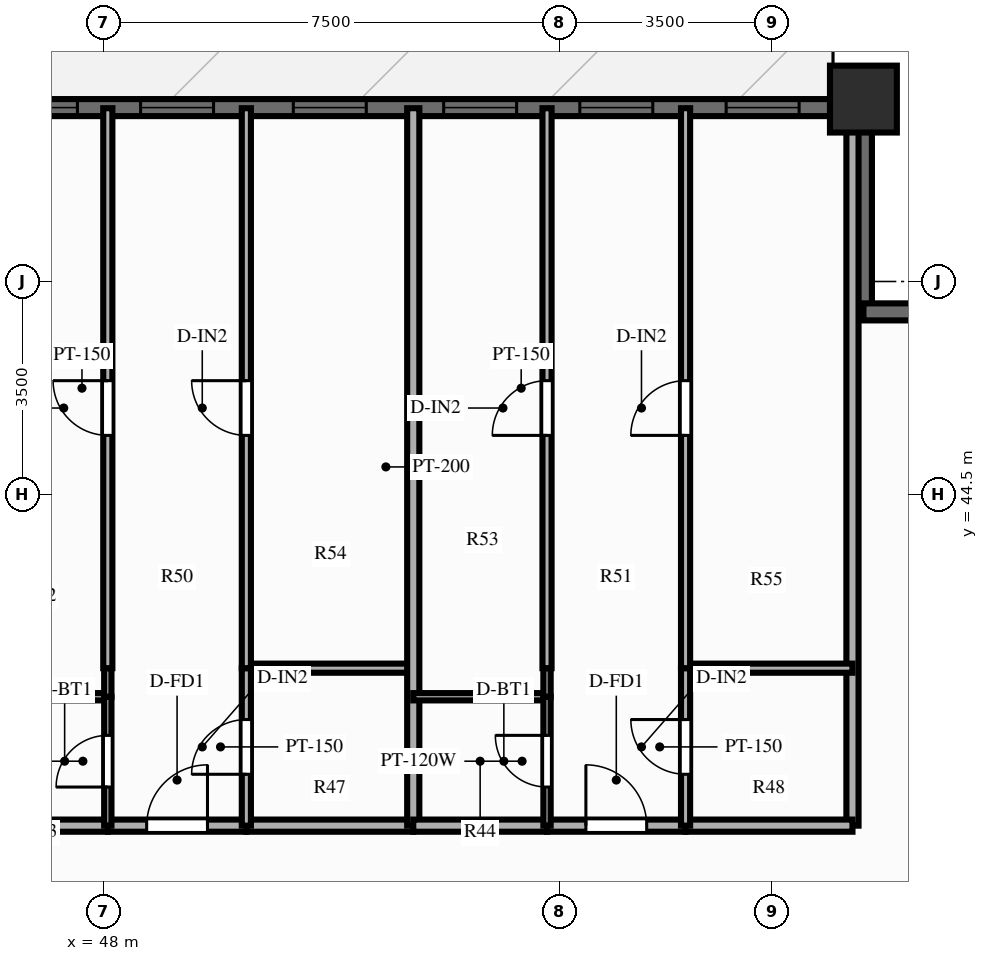
"""IFC4 building model, lengths in metres.
Left out: names, types, materials, properties, quantities, classifications, styles, units other than length and angle.
Written with IfcOpenShell. Run it as: python <this file> out.ifc"""

import sys

from ifc_helpers import new_model, si_unit, direction, frame, frame_2d, origin, origin_2d, place, context, subcontext, project, spatial, rectangle, extrude, source, transform, mapped, element, fill, save


model = new_model("IFC4")
c1 = context("Model", 3, precision=1e-05, world=origin(), true_north=direction((0.0, 1.0)))
c2 = subcontext(c1, "Body", "Model", "MODEL_VIEW")
j1 = project(units=[si_unit("LENGTHUNIT", "METRE"), si_unit("PLANEANGLEUNIT", "RADIAN")], contexts=[c1])
p1 = place(None, origin())
s1 = spatial("IfcSite", under=j1, at=p1, CompositionType="ELEMENT")
p2 = place(p1, origin())
s2 = spatial("IfcBuilding", under=s1, at=p2, CompositionType="ELEMENT")
p3 = place(p2, frame((0.0, 0.0, 22.4)))
s3 = spatial("IfcBuildingStorey", under=s2, at=p3, CompositionType="ELEMENT", Elevation=22.4)
m1 = source(origin(), c2, "Body", "SweptSolid", [
    extrude(rectangle(XDim=1.1, YDim=1.1, at=origin_2d()), origin(), (0.0, 0.0, 1.0), 3.0),
])
p4 = place(p3, frame((60.5, 51.0, 0.0), z_axis=(0.0, 0.0, 1.0), x_axis=(1.0, 0.0, 0.0)))
e1 = element("IfcColumn", 1, at=p4, inside=s3, PredefinedType="COLUMN", context=c2, shape_type="MappedRepresentation", body=[
    mapped(m1, transform((0.0, 0.0, 0.0), scale=1.0)),
])
p5 = place(p3, frame((15.5, 50.86, 0.0), z_axis=(0.0, 0.0, 1.0), x_axis=(1.0, 0.0, 0.0)))
e2 = element("IfcWall", 2, at=p5, inside=s3, PredefinedType="SOLIDWALL", context=c2, shape_type="SweptSolid", body=[
    extrude(rectangle(XDim=45.0, YDim=0.28, at=frame_2d((22.5, 0.0))), origin(), (0.0, 0.0, 1.0), 2.28),
])
p6 = place(p5, frame((0.76, 0.0, 0.25)))
e3 = element("IfcOpeningElement", 3, at=p6, cuts=e2, PredefinedType="OPENING", context=c2, shape_type="SweptSolid", body=[
    extrude(rectangle(XDim=1.2, YDim=1.5, at=frame_2d((0.6, 0.75))), frame((0.0, 0.152, 0.0), z_axis=(0.0, -1.0, 0.0), x_axis=(1.0, 0.0, 0.0)), (0.0, 0.0, 1.0), 0.304),
])
p7 = place(p5, frame((3.494, 0.0, 0.25)))
e4 = element("IfcOpeningElement", 4, at=p7, cuts=e2, PredefinedType="OPENING", context=c2, shape_type="SweptSolid", body=[
    extrude(rectangle(XDim=1.2, YDim=1.5, at=frame_2d((0.6, 0.75))), frame((0.0, 0.152, 0.0), z_axis=(0.0, -1.0, 0.0), x_axis=(1.0, 0.0, 0.0)), (0.0, 0.0, 1.0), 0.304),
])
p8 = place(p5, frame((8.741, 0.0, 0.25)))
e5 = element("IfcOpeningElement", 5, at=p8, cuts=e2, PredefinedType="OPENING", context=c2, shape_type="SweptSolid", body=[
    extrude(rectangle(XDim=1.2, YDim=1.5, at=frame_2d((0.6, 0.75))), frame((0.0, 0.152, 0.0), z_axis=(0.0, -1.0, 0.0), x_axis=(1.0, 0.0, 0.0)), (0.0, 0.0, 1.0), 0.304),
])
p9 = place(p5, frame((13.616, 0.0, 0.25)))
e6 = element("IfcOpeningElement", 6, at=p9, cuts=e2, PredefinedType="OPENING", context=c2, shape_type="SweptSolid", body=[
    extrude(rectangle(XDim=1.2, YDim=1.5, at=frame_2d((0.6, 0.75))), frame((0.0, 0.152, 0.0), z_axis=(0.0, -1.0, 0.0), x_axis=(1.0, 0.0, 0.0)), (0.0, 0.0, 1.0), 0.304),
])
p10 = place(p5, frame((17.146, 0.0, 0.25)))
e7 = element("IfcOpeningElement", 7, at=p10, cuts=e2, PredefinedType="OPENING", context=c2, shape_type="SweptSolid", body=[
    extrude(rectangle(XDim=1.2, YDim=1.5, at=frame_2d((0.6, 0.75))), frame((0.0, 0.152, 0.0), z_axis=(0.0, -1.0, 0.0), x_axis=(1.0, 0.0, 0.0)), (0.0, 0.0, 1.0), 0.304),
])
p11 = place(p5, frame((22.423, 0.0, 0.0)))
e8 = element("IfcOpeningElement", 8, at=p11, cuts=e2, PredefinedType="OPENING", context=c2, shape_type="SweptSolid", body=[
    extrude(rectangle(XDim=1.1, YDim=2.15, at=frame_2d((0.55, 1.075))), frame((0.0, 0.152, 0.0), z_axis=(0.0, -1.0, 0.0), x_axis=(1.0, 0.0, 0.0)), (0.0, 0.0, 1.0), 0.304),
])
p12 = place(p5, frame((27.252, 0.0, 0.25)))
e9 = element("IfcOpeningElement", 9, at=p12, cuts=e2, PredefinedType="OPENING", context=c2, shape_type="SweptSolid", body=[
    extrude(rectangle(XDim=0.95, YDim=1.5, at=frame_2d((0.475, 0.75))), frame((0.0, 0.152, 0.0), z_axis=(0.0, -1.0, 0.0), x_axis=(1.0, 0.0, 0.0)), (0.0, 0.0, 1.0), 0.304),
])
p13 = place(p5, frame((30.873, 0.0, 0.25)))
e10 = element("IfcOpeningElement", 10, at=p13, cuts=e2, PredefinedType="OPENING", context=c2, shape_type="SweptSolid", body=[
    extrude(rectangle(XDim=1.2, YDim=1.5, at=frame_2d((0.6, 0.75))), frame((0.0, 0.152, 0.0), z_axis=(0.0, -1.0, 0.0), x_axis=(1.0, 0.0, 0.0)), (0.0, 0.0, 1.0), 0.304),
])
p14 = place(p5, frame((33.113, 0.0, 0.25)))
e11 = element("IfcOpeningElement", 11, at=p14, cuts=e2, PredefinedType="OPENING", context=c2, shape_type="SweptSolid", body=[
    extrude(rectangle(XDim=1.2, YDim=1.5, at=frame_2d((0.6, 0.75))), frame((0.0, 0.152, 0.0), z_axis=(0.0, -1.0, 0.0), x_axis=(1.0, 0.0, 0.0)), (0.0, 0.0, 1.0), 0.304),
])
p15 = place(p5, frame((35.624, 0.0, 0.25)))
e12 = element("IfcOpeningElement", 12, at=p15, cuts=e2, PredefinedType="OPENING", context=c2, shape_type="SweptSolid", body=[
    extrude(rectangle(XDim=1.2, YDim=1.5, at=frame_2d((0.6, 0.75))), frame((0.0, 0.152, 0.0), z_axis=(0.0, -1.0, 0.0), x_axis=(1.0, 0.0, 0.0)), (0.0, 0.0, 1.0), 0.304),
])
p16 = place(p5, frame((38.097, 0.0, 0.25)))
e13 = element("IfcOpeningElement", 13, at=p16, cuts=e2, PredefinedType="OPENING", context=c2, shape_type="SweptSolid", body=[
    extrude(rectangle(XDim=1.2, YDim=1.5, at=frame_2d((0.6, 0.75))), frame((0.0, 0.152, 0.0), z_axis=(0.0, -1.0, 0.0), x_axis=(1.0, 0.0, 0.0)), (0.0, 0.0, 1.0), 0.304),
])
p17 = place(p5, frame((40.336, 0.0, 0.25)))
e14 = element("IfcOpeningElement", 14, at=p17, cuts=e2, PredefinedType="OPENING", context=c2, shape_type="SweptSolid", body=[
    extrude(rectangle(XDim=1.2, YDim=1.5, at=frame_2d((0.6, 0.75))), frame((0.0, 0.152, 0.0), z_axis=(0.0, -1.0, 0.0), x_axis=(1.0, 0.0, 0.0)), (0.0, 0.0, 1.0), 0.304),
])
p18 = place(p5, frame((42.743, 0.0, 0.25)))
e15 = element("IfcOpeningElement", 15, at=p18, cuts=e2, PredefinedType="OPENING", context=c2, shape_type="SweptSolid", body=[
    extrude(rectangle(XDim=1.2, YDim=1.5, at=frame_2d((0.6, 0.75))), frame((0.0, 0.152, 0.0), z_axis=(0.0, -1.0, 0.0), x_axis=(1.0, 0.0, 0.0)), (0.0, 0.0, 1.0), 0.304),
])
for number, where, z_axis, x_axis in (
    (16, (60.5, 47.5, 0.0), (0.0, 0.0, 1.0), (0.0, 1.0, 0.0)),
    (17, (60.5, 47.5, 0.0), (0.0, 0.0, 1.0), (1.0, 0.0, 0.0)),
):
    element("IfcWall", number, at=place(p3, frame(where, z_axis=z_axis, x_axis=x_axis)), inside=s3, PredefinedType="SOLIDWALL", context=c2, shape_type="SweptSolid", body=[
        extrude(rectangle(XDim=3.42, YDim=0.28, at=frame_2d((1.71, 0.0))), origin(), (0.0, 0.0, 1.0), 2.28),
    ])
p19 = place(p3, frame((60.32, 39.05, 0.0), z_axis=(0.0, 0.0, 1.0), x_axis=(0.0, 1.0, 0.0)))
e18 = element("IfcWall", 18, at=p19, inside=s3, PredefinedType="PARTITIONING", context=c2, shape_type="SweptSolid", body=[
    extrude(rectangle(XDim=11.8, YDim=0.2, at=frame_2d((5.9, 0.0))), origin(), (0.0, 0.0, 1.0), 2.79),
])
p20 = place(p3, frame((45.873, 39.05, 0.0), z_axis=(0.0, 0.0, 1.0), x_axis=(1.0, 0.0, 0.0)))
e19 = element("IfcWall", 19, at=p20, inside=s3, PredefinedType="PARTITIONING", context=c2, shape_type="SweptSolid", body=[
    extrude(rectangle(XDim=2.2, YDim=0.2, at=frame_2d((1.1, 0.0))), origin(), (0.0, 0.0, 1.0), 2.79),
])
p21 = place(p3, frame((48.073, 39.05, 0.0), z_axis=(0.0, 0.0, 1.0), x_axis=(1.0, 0.0, 0.0)))
e20 = element("IfcWall", 20, at=p21, inside=s3, PredefinedType="PARTITIONING", context=c2, shape_type="SweptSolid", body=[
    extrude(rectangle(XDim=2.278, YDim=0.2, at=frame_2d((1.139, 0.0))), origin(), (0.0, 0.0, 1.0), 2.79),
])
p22 = place(p21, frame((0.639, 0.0, 0.0)))
e21 = element("IfcOpeningElement", 21, at=p22, cuts=e20, PredefinedType="OPENING", context=c2, shape_type="SweptSolid", body=[
    extrude(rectangle(XDim=1.0, YDim=2.15, at=frame_2d((0.5, 1.075))), frame((0.0, 0.112, 0.0), z_axis=(0.0, -1.0, 0.0), x_axis=(1.0, 0.0, 0.0)), (0.0, 0.0, 1.0), 0.224),
])
p23 = place(p3, frame((50.352, 39.05, 0.0), z_axis=(0.0, 0.0, 1.0), x_axis=(1.0, 0.0, 0.0)))
e22 = element("IfcWall", 22, at=p23, inside=s3, PredefinedType="PARTITIONING", context=c2, shape_type="SweptSolid", body=[
    extrude(rectangle(XDim=2.745, YDim=0.2, at=frame_2d((1.373, 0.0))), origin(), (0.0, 0.0, 1.0), 2.79),
])
p24 = place(p3, frame((45.873, 41.17, 0.0), z_axis=(0.0, 0.0, 1.0), x_axis=(1.0, 0.0, 0.0)))
e23 = element("IfcWall", 23, at=p24, inside=s3, PredefinedType="PARTITIONING", context=c2, shape_type="SweptSolid", body=[
    extrude(rectangle(XDim=2.2, YDim=0.12, at=frame_2d((1.1, 0.0))), origin(), (0.0, 0.0, 1.0), 2.79),
])
p25 = place(p3, frame((50.352, 41.64, 0.0), z_axis=(0.0, 0.0, 1.0), x_axis=(1.0, 0.0, 0.0)))
e24 = element("IfcWall", 24, at=p25, inside=s3, PredefinedType="PARTITIONING", context=c2, shape_type="SweptSolid", body=[
    extrude(rectangle(XDim=2.745, YDim=0.15, at=frame_2d((1.373, 0.0))), origin(), (0.0, 0.0, 1.0), 2.79),
])
p26 = place(p3, frame((48.073, 39.05, 0.0), z_axis=(0.0, 0.0, 1.0), x_axis=(0.0, 1.0, 0.0)))
e25 = element("IfcWall", 25, at=p26, inside=s3, PredefinedType="PARTITIONING", context=c2, shape_type="SweptSolid", body=[
    extrude(rectangle(XDim=2.12, YDim=0.12, at=frame_2d((1.06, 0.0))), origin(), (0.0, 0.0, 1.0), 2.79),
])
p27 = place(p26, frame((0.635, 0.0, 0.0)))
e26 = element("IfcOpeningElement", 26, at=p27, cuts=e25, PredefinedType="OPENING", context=c2, shape_type="SweptSolid", body=[
    extrude(rectangle(XDim=0.85, YDim=2.05, at=frame_2d((0.425, 1.025))), frame((0.0, 0.072, 0.0), z_axis=(0.0, -1.0, 0.0), x_axis=(1.0, 0.0, 0.0)), (0.0, 0.0, 1.0), 0.144),
])
p28 = place(p3, frame((48.073, 41.17, 0.0), z_axis=(0.0, 0.0, 1.0), x_axis=(0.0, 1.0, 0.0)))
e27 = element("IfcWall", 27, at=p28, inside=s3, PredefinedType="PARTITIONING", context=c2, shape_type="SweptSolid", body=[
    extrude(rectangle(XDim=0.47, YDim=0.12, at=frame_2d((0.235, 0.0))), origin(), (0.0, 0.0, 1.0), 2.79),
])
p29 = place(p3, frame((48.073, 41.64, 0.0), z_axis=(0.0, 0.0, 1.0), x_axis=(0.0, 1.0, 0.0)))
e28 = element("IfcWall", 28, at=p29, inside=s3, PredefinedType="PARTITIONING", context=c2, shape_type="SweptSolid", body=[
    extrude(rectangle(XDim=9.21, YDim=0.15, at=frame_2d((4.605, 0.0))), origin(), (0.0, 0.0, 1.0), 2.79),
])
p30 = place(p29, frame((3.829, 0.0, 0.0)))
e29 = element("IfcOpeningElement", 29, at=p30, cuts=e28, PredefinedType="OPENING", context=c2, shape_type="SweptSolid", body=[
    extrude(rectangle(XDim=0.9, YDim=2.1, at=frame_2d((0.45, 1.05))), frame((0.0, 0.087, 0.0), z_axis=(0.0, -1.0, 0.0), x_axis=(1.0, 0.0, 0.0)), (0.0, 0.0, 1.0), 0.174),
])
p31 = place(p3, frame((50.352, 39.05, 0.0), z_axis=(0.0, 0.0, 1.0), x_axis=(0.0, 1.0, 0.0)))
e30 = element("IfcWall", 30, at=p31, inside=s3, PredefinedType="PARTITIONING", context=c2, shape_type="SweptSolid", body=[
    extrude(rectangle(XDim=2.59, YDim=0.15, at=frame_2d((1.295, 0.0))), origin(), (0.0, 0.0, 1.0), 2.79),
])
p32 = place(p31, frame((0.845, 0.0, 0.0)))
e31 = element("IfcOpeningElement", 31, at=p32, cuts=e30, PredefinedType="OPENING", context=c2, shape_type="SweptSolid", body=[
    extrude(rectangle(XDim=0.9, YDim=2.1, at=frame_2d((0.45, 1.05))), frame((0.0, 0.087, 0.0), z_axis=(0.0, -1.0, 0.0), x_axis=(1.0, 0.0, 0.0)), (0.0, 0.0, 1.0), 0.174),
])
p33 = place(p3, frame((50.352, 41.64, 0.0), z_axis=(0.0, 0.0, 1.0), x_axis=(0.0, 1.0, 0.0)))
e32 = element("IfcWall", 32, at=p33, inside=s3, PredefinedType="PARTITIONING", context=c2, shape_type="SweptSolid", body=[
    extrude(rectangle(XDim=9.21, YDim=0.15, at=frame_2d((4.605, 0.0))), origin(), (0.0, 0.0, 1.0), 2.79),
])
p34 = place(p33, frame((3.829, 0.0, 0.0)))
e33 = element("IfcOpeningElement", 33, at=p34, cuts=e32, PredefinedType="OPENING", context=c2, shape_type="SweptSolid", body=[
    extrude(rectangle(XDim=0.9, YDim=2.1, at=frame_2d((0.45, 1.05))), frame((0.0, 0.087, 0.0), z_axis=(0.0, -1.0, 0.0), x_axis=(1.0, 0.0, 0.0)), (0.0, 0.0, 1.0), 0.174),
])
p35 = place(p3, frame((53.097, 39.05, 0.0), z_axis=(0.0, 0.0, 1.0), x_axis=(0.0, 1.0, 0.0)))
e34 = element("IfcWall", 34, at=p35, inside=s3, PredefinedType="PARTITIONING", context=c2, shape_type="SweptSolid", body=[
    extrude(rectangle(XDim=11.8, YDim=0.2, at=frame_2d((5.9, 0.0))), origin(), (0.0, 0.0, 1.0), 2.79),
])
p36 = place(p3, frame((53.097, 39.05, 0.0), z_axis=(0.0, 0.0, 1.0), x_axis=(1.0, 0.0, 0.0)))
e35 = element("IfcWall", 35, at=p36, inside=s3, PredefinedType="PARTITIONING", context=c2, shape_type="SweptSolid", body=[
    extrude(rectangle(XDim=2.2, YDim=0.2, at=frame_2d((1.1, 0.0))), origin(), (0.0, 0.0, 1.0), 2.79),
])
p37 = place(p3, frame((55.297, 39.05, 0.0), z_axis=(0.0, 0.0, 1.0), x_axis=(1.0, 0.0, 0.0)))
e36 = element("IfcWall", 36, at=p37, inside=s3, PredefinedType="PARTITIONING", context=c2, shape_type="SweptSolid", body=[
    extrude(rectangle(XDim=2.279, YDim=0.2, at=frame_2d((1.139, 0.0))), origin(), (0.0, 0.0, 1.0), 2.79),
])
p38 = place(p37, frame((0.639, 0.0, 0.0)))
e37 = element("IfcOpeningElement", 37, at=p38, cuts=e36, PredefinedType="OPENING", context=c2, shape_type="SweptSolid", body=[
    extrude(rectangle(XDim=1.0, YDim=2.15, at=frame_2d((0.5, 1.075))), frame((0.0, 0.112, 0.0), z_axis=(0.0, -1.0, 0.0), x_axis=(1.0, 0.0, 0.0)), (0.0, 0.0, 1.0), 0.224),
])
p39 = place(p3, frame((57.575, 39.05, 0.0), z_axis=(0.0, 0.0, 1.0), x_axis=(1.0, 0.0, 0.0)))
e38 = element("IfcWall", 38, at=p39, inside=s3, PredefinedType="PARTITIONING", context=c2, shape_type="SweptSolid", body=[
    extrude(rectangle(XDim=2.745, YDim=0.2, at=frame_2d((1.373, 0.0))), origin(), (0.0, 0.0, 1.0), 2.79),
])
p40 = place(p3, frame((53.097, 41.17, 0.0), z_axis=(0.0, 0.0, 1.0), x_axis=(1.0, 0.0, 0.0)))
e39 = element("IfcWall", 39, at=p40, inside=s3, PredefinedType="PARTITIONING", context=c2, shape_type="SweptSolid", body=[
    extrude(rectangle(XDim=2.2, YDim=0.12, at=frame_2d((1.1, 0.0))), origin(), (0.0, 0.0, 1.0), 2.79),
])
p41 = place(p3, frame((57.575, 41.64, 0.0), z_axis=(0.0, 0.0, 1.0), x_axis=(1.0, 0.0, 0.0)))
e40 = element("IfcWall", 40, at=p41, inside=s3, PredefinedType="PARTITIONING", context=c2, shape_type="SweptSolid", body=[
    extrude(rectangle(XDim=2.745, YDim=0.15, at=frame_2d((1.373, 0.0))), origin(), (0.0, 0.0, 1.0), 2.79),
])
p42 = place(p3, frame((55.297, 39.05, 0.0), z_axis=(0.0, 0.0, 1.0), x_axis=(0.0, 1.0, 0.0)))
e41 = element("IfcWall", 41, at=p42, inside=s3, PredefinedType="PARTITIONING", context=c2, shape_type="SweptSolid", body=[
    extrude(rectangle(XDim=2.12, YDim=0.12, at=frame_2d((1.06, 0.0))), origin(), (0.0, 0.0, 1.0), 2.79),
])
p43 = place(p42, frame((0.635, 0.0, 0.0)))
e42 = element("IfcOpeningElement", 42, at=p43, cuts=e41, PredefinedType="OPENING", context=c2, shape_type="SweptSolid", body=[
    extrude(rectangle(XDim=0.85, YDim=2.05, at=frame_2d((0.425, 1.025))), frame((0.0, 0.072, 0.0), z_axis=(0.0, -1.0, 0.0), x_axis=(1.0, 0.0, 0.0)), (0.0, 0.0, 1.0), 0.144),
])
p44 = place(p3, frame((55.297, 41.17, 0.0), z_axis=(0.0, 0.0, 1.0), x_axis=(0.0, 1.0, 0.0)))
e43 = element("IfcWall", 43, at=p44, inside=s3, PredefinedType="PARTITIONING", context=c2, shape_type="SweptSolid", body=[
    extrude(rectangle(XDim=0.47, YDim=0.12, at=frame_2d((0.235, 0.0))), origin(), (0.0, 0.0, 1.0), 2.79),
])
p45 = place(p3, frame((55.297, 41.64, 0.0), z_axis=(0.0, 0.0, 1.0), x_axis=(0.0, 1.0, 0.0)))
e44 = element("IfcWall", 44, at=p45, inside=s3, PredefinedType="PARTITIONING", context=c2, shape_type="SweptSolid", body=[
    extrude(rectangle(XDim=9.21, YDim=0.15, at=frame_2d((4.605, 0.0))), origin(), (0.0, 0.0, 1.0), 2.79),
])
p46 = place(p45, frame((3.829, 0.0, 0.0)))
e45 = element("IfcOpeningElement", 45, at=p46, cuts=e44, PredefinedType="OPENING", context=c2, shape_type="SweptSolid", body=[
    extrude(rectangle(XDim=0.9, YDim=2.1, at=frame_2d((0.45, 1.05))), frame((0.0, 0.087, 0.0), z_axis=(0.0, -1.0, 0.0), x_axis=(1.0, 0.0, 0.0)), (0.0, 0.0, 1.0), 0.174),
])
p47 = place(p3, frame((57.575, 39.05, 0.0), z_axis=(0.0, 0.0, 1.0), x_axis=(0.0, 1.0, 0.0)))
e46 = element("IfcWall", 46, at=p47, inside=s3, PredefinedType="PARTITIONING", context=c2, shape_type="SweptSolid", body=[
    extrude(rectangle(XDim=2.59, YDim=0.15, at=frame_2d((1.295, 0.0))), origin(), (0.0, 0.0, 1.0), 2.79),
])
p48 = place(p47, frame((0.845, 0.0, 0.0)))
e47 = element("IfcOpeningElement", 47, at=p48, cuts=e46, PredefinedType="OPENING", context=c2, shape_type="SweptSolid", body=[
    extrude(rectangle(XDim=0.9, YDim=2.1, at=frame_2d((0.45, 1.05))), frame((0.0, 0.087, 0.0), z_axis=(0.0, -1.0, 0.0), x_axis=(1.0, 0.0, 0.0)), (0.0, 0.0, 1.0), 0.174),
])
p49 = place(p3, frame((57.575, 41.64, 0.0), z_axis=(0.0, 0.0, 1.0), x_axis=(0.0, 1.0, 0.0)))
e48 = element("IfcWall", 48, at=p49, inside=s3, PredefinedType="PARTITIONING", context=c2, shape_type="SweptSolid", body=[
    extrude(rectangle(XDim=9.21, YDim=0.15, at=frame_2d((4.605, 0.0))), origin(), (0.0, 0.0, 1.0), 2.79),
])
p50 = place(p49, frame((3.829, 0.0, 0.0)))
e49 = element("IfcOpeningElement", 49, at=p50, cuts=e48, PredefinedType="OPENING", context=c2, shape_type="SweptSolid", body=[
    extrude(rectangle(XDim=0.9, YDim=2.1, at=frame_2d((0.45, 1.05))), frame((0.0, 0.087, 0.0), z_axis=(0.0, -1.0, 0.0), x_axis=(1.0, 0.0, 0.0)), (0.0, 0.0, 1.0), 0.174),
])
m2 = source(origin(), c2, "Body", "SweptSolid", [
    extrude(rectangle(XDim=1.2, YDim=1.5, at=frame_2d((0.6, 0.75))), frame((0.0, 0.03, 0.0), z_axis=(0.0, -1.0, 0.0), x_axis=(1.0, 0.0, 0.0)), (0.0, 0.0, 1.0), 0.06),
])
p51 = place(p13, origin())
e50 = element("IfcWindow", 50, at=p51, inside=s3, PartitioningType="SINGLE_PANEL", PredefinedType="WINDOW", context=c2, shape_type="MappedRepresentation", body=[
    mapped(m2, transform((0.0, 0.0, 0.0), scale=1.0)),
])
fill(e10, e50)
p52 = place(p14, origin())
e51 = element("IfcWindow", 51, at=p52, inside=s3, PartitioningType="SINGLE_PANEL", PredefinedType="WINDOW", context=c2, shape_type="MappedRepresentation", body=[
    mapped(m2, transform((0.0, 0.0, 0.0), scale=1.0)),
])
fill(e11, e51)
p53 = place(p15, origin())
e52 = element("IfcWindow", 52, at=p53, inside=s3, PartitioningType="SINGLE_PANEL", PredefinedType="WINDOW", context=c2, shape_type="MappedRepresentation", body=[
    mapped(m2, transform((0.0, 0.0, 0.0), scale=1.0)),
])
fill(e12, e52)
p54 = place(p16, origin())
e53 = element("IfcWindow", 53, at=p54, inside=s3, PartitioningType="SINGLE_PANEL", PredefinedType="WINDOW", context=c2, shape_type="MappedRepresentation", body=[
    mapped(m2, transform((0.0, 0.0, 0.0), scale=1.0)),
])
fill(e13, e53)
p55 = place(p17, origin())
e54 = element("IfcWindow", 54, at=p55, inside=s3, PartitioningType="SINGLE_PANEL", PredefinedType="WINDOW", context=c2, shape_type="MappedRepresentation", body=[
    mapped(m2, transform((0.0, 0.0, 0.0), scale=1.0)),
])
fill(e14, e54)
p56 = place(p18, origin())
e55 = element("IfcWindow", 55, at=p56, inside=s3, PartitioningType="SINGLE_PANEL", PredefinedType="WINDOW", context=c2, shape_type="MappedRepresentation", body=[
    mapped(m2, transform((0.0, 0.0, 0.0), scale=1.0)),
])
fill(e15, e55)
m3 = source(origin(), c2, "Body", "SweptSolid", [
    extrude(rectangle(XDim=1.0, YDim=2.15, at=frame_2d((0.5, 1.075))), frame((0.0, 0.025, 0.0), z_axis=(0.0, -1.0, 0.0), x_axis=(1.0, 0.0, 0.0)), (0.0, 0.0, 1.0), 0.05),
])
p57 = place(p22, origin())
e56 = element("IfcDoor", 56, at=p57, inside=s3, OperationType="SINGLE_SWING_RIGHT", PredefinedType="DOOR", context=c2, shape_type="MappedRepresentation", body=[
    mapped(m3, transform((0.0, 0.0, 0.0), scale=1.0)),
])
fill(e21, e56)
m4 = source(origin(), c2, "Body", "SweptSolid", [
    extrude(rectangle(XDim=0.85, YDim=2.05, at=frame_2d((0.425, 1.025))), frame((0.0, 0.025, 0.0), z_axis=(0.0, -1.0, 0.0), x_axis=(1.0, 0.0, 0.0)), (0.0, 0.0, 1.0), 0.05),
])
p58 = place(p27, origin())
e57 = element("IfcDoor", 57, at=p58, inside=s3, OperationType="SINGLE_SWING_LEFT", PredefinedType="DOOR", context=c2, shape_type="MappedRepresentation", body=[
    mapped(m4, transform((0.0, 0.0, 0.0), scale=1.0)),
])
fill(e26, e57)
m5 = source(origin(), c2, "Body", "SweptSolid", [
    extrude(rectangle(XDim=0.9, YDim=2.1, at=frame_2d((0.45, 1.05))), frame((0.0, 0.025, 0.0), z_axis=(0.0, -1.0, 0.0), x_axis=(1.0, 0.0, 0.0)), (0.0, 0.0, 1.0), 0.05),
])
p59 = place(p30, origin())
e58 = element("IfcDoor", 58, at=p59, inside=s3, OperationType="SINGLE_SWING_RIGHT", PredefinedType="DOOR", context=c2, shape_type="MappedRepresentation", body=[
    mapped(m5, transform((0.0, 0.0, 0.0), scale=1.0)),
])
fill(e29, e58)
p60 = place(p32, origin())
e59 = element("IfcDoor", 59, at=p60, inside=s3, OperationType="SINGLE_SWING_LEFT", PredefinedType="DOOR", context=c2, shape_type="MappedRepresentation", body=[
    mapped(m5, transform((0.0, 0.0, 0.0), scale=1.0)),
])
fill(e31, e59)
p61 = place(p34, origin())
e60 = element("IfcDoor", 60, at=p61, inside=s3, OperationType="SINGLE_SWING_RIGHT", PredefinedType="DOOR", context=c2, shape_type="MappedRepresentation", body=[
    mapped(m5, transform((0.0, 0.0, 0.0), scale=1.0)),
])
fill(e33, e60)
p62 = place(p38, origin())
e61 = element("IfcDoor", 61, at=p62, inside=s3, OperationType="SINGLE_SWING_LEFT", PredefinedType="DOOR", context=c2, shape_type="MappedRepresentation", body=[
    mapped(m3, transform((0.0, 0.0, 0.0), scale=1.0)),
])
fill(e37, e61)
p63 = place(p43, origin())
e62 = element("IfcDoor", 62, at=p63, inside=s3, OperationType="SINGLE_SWING_RIGHT", PredefinedType="DOOR", context=c2, shape_type="MappedRepresentation", body=[
    mapped(m4, transform((0.0, 0.0, 0.0), scale=1.0)),
])
fill(e42, e62)
p64 = place(p46, origin())
e63 = element("IfcDoor", 63, at=p64, inside=s3, OperationType="SINGLE_SWING_LEFT", PredefinedType="DOOR", context=c2, shape_type="MappedRepresentation", body=[
    mapped(m5, transform((0.0, 0.0, 0.0), scale=1.0)),
])
fill(e45, e63)
p65 = place(p48, origin())
e64 = element("IfcDoor", 64, at=p65, inside=s3, OperationType="SINGLE_SWING_RIGHT", PredefinedType="DOOR", context=c2, shape_type="MappedRepresentation", body=[
    mapped(m5, transform((0.0, 0.0, 0.0), scale=1.0)),
])
fill(e47, e64)
p66 = place(p50, origin())
e65 = element("IfcDoor", 65, at=p66, inside=s3, OperationType="SINGLE_SWING_LEFT", PredefinedType="DOOR", context=c2, shape_type="MappedRepresentation", body=[
    mapped(m5, transform((0.0, 0.0, 0.0), scale=1.0)),
])
fill(e49, e65)
save(model, sys.argv[1])
